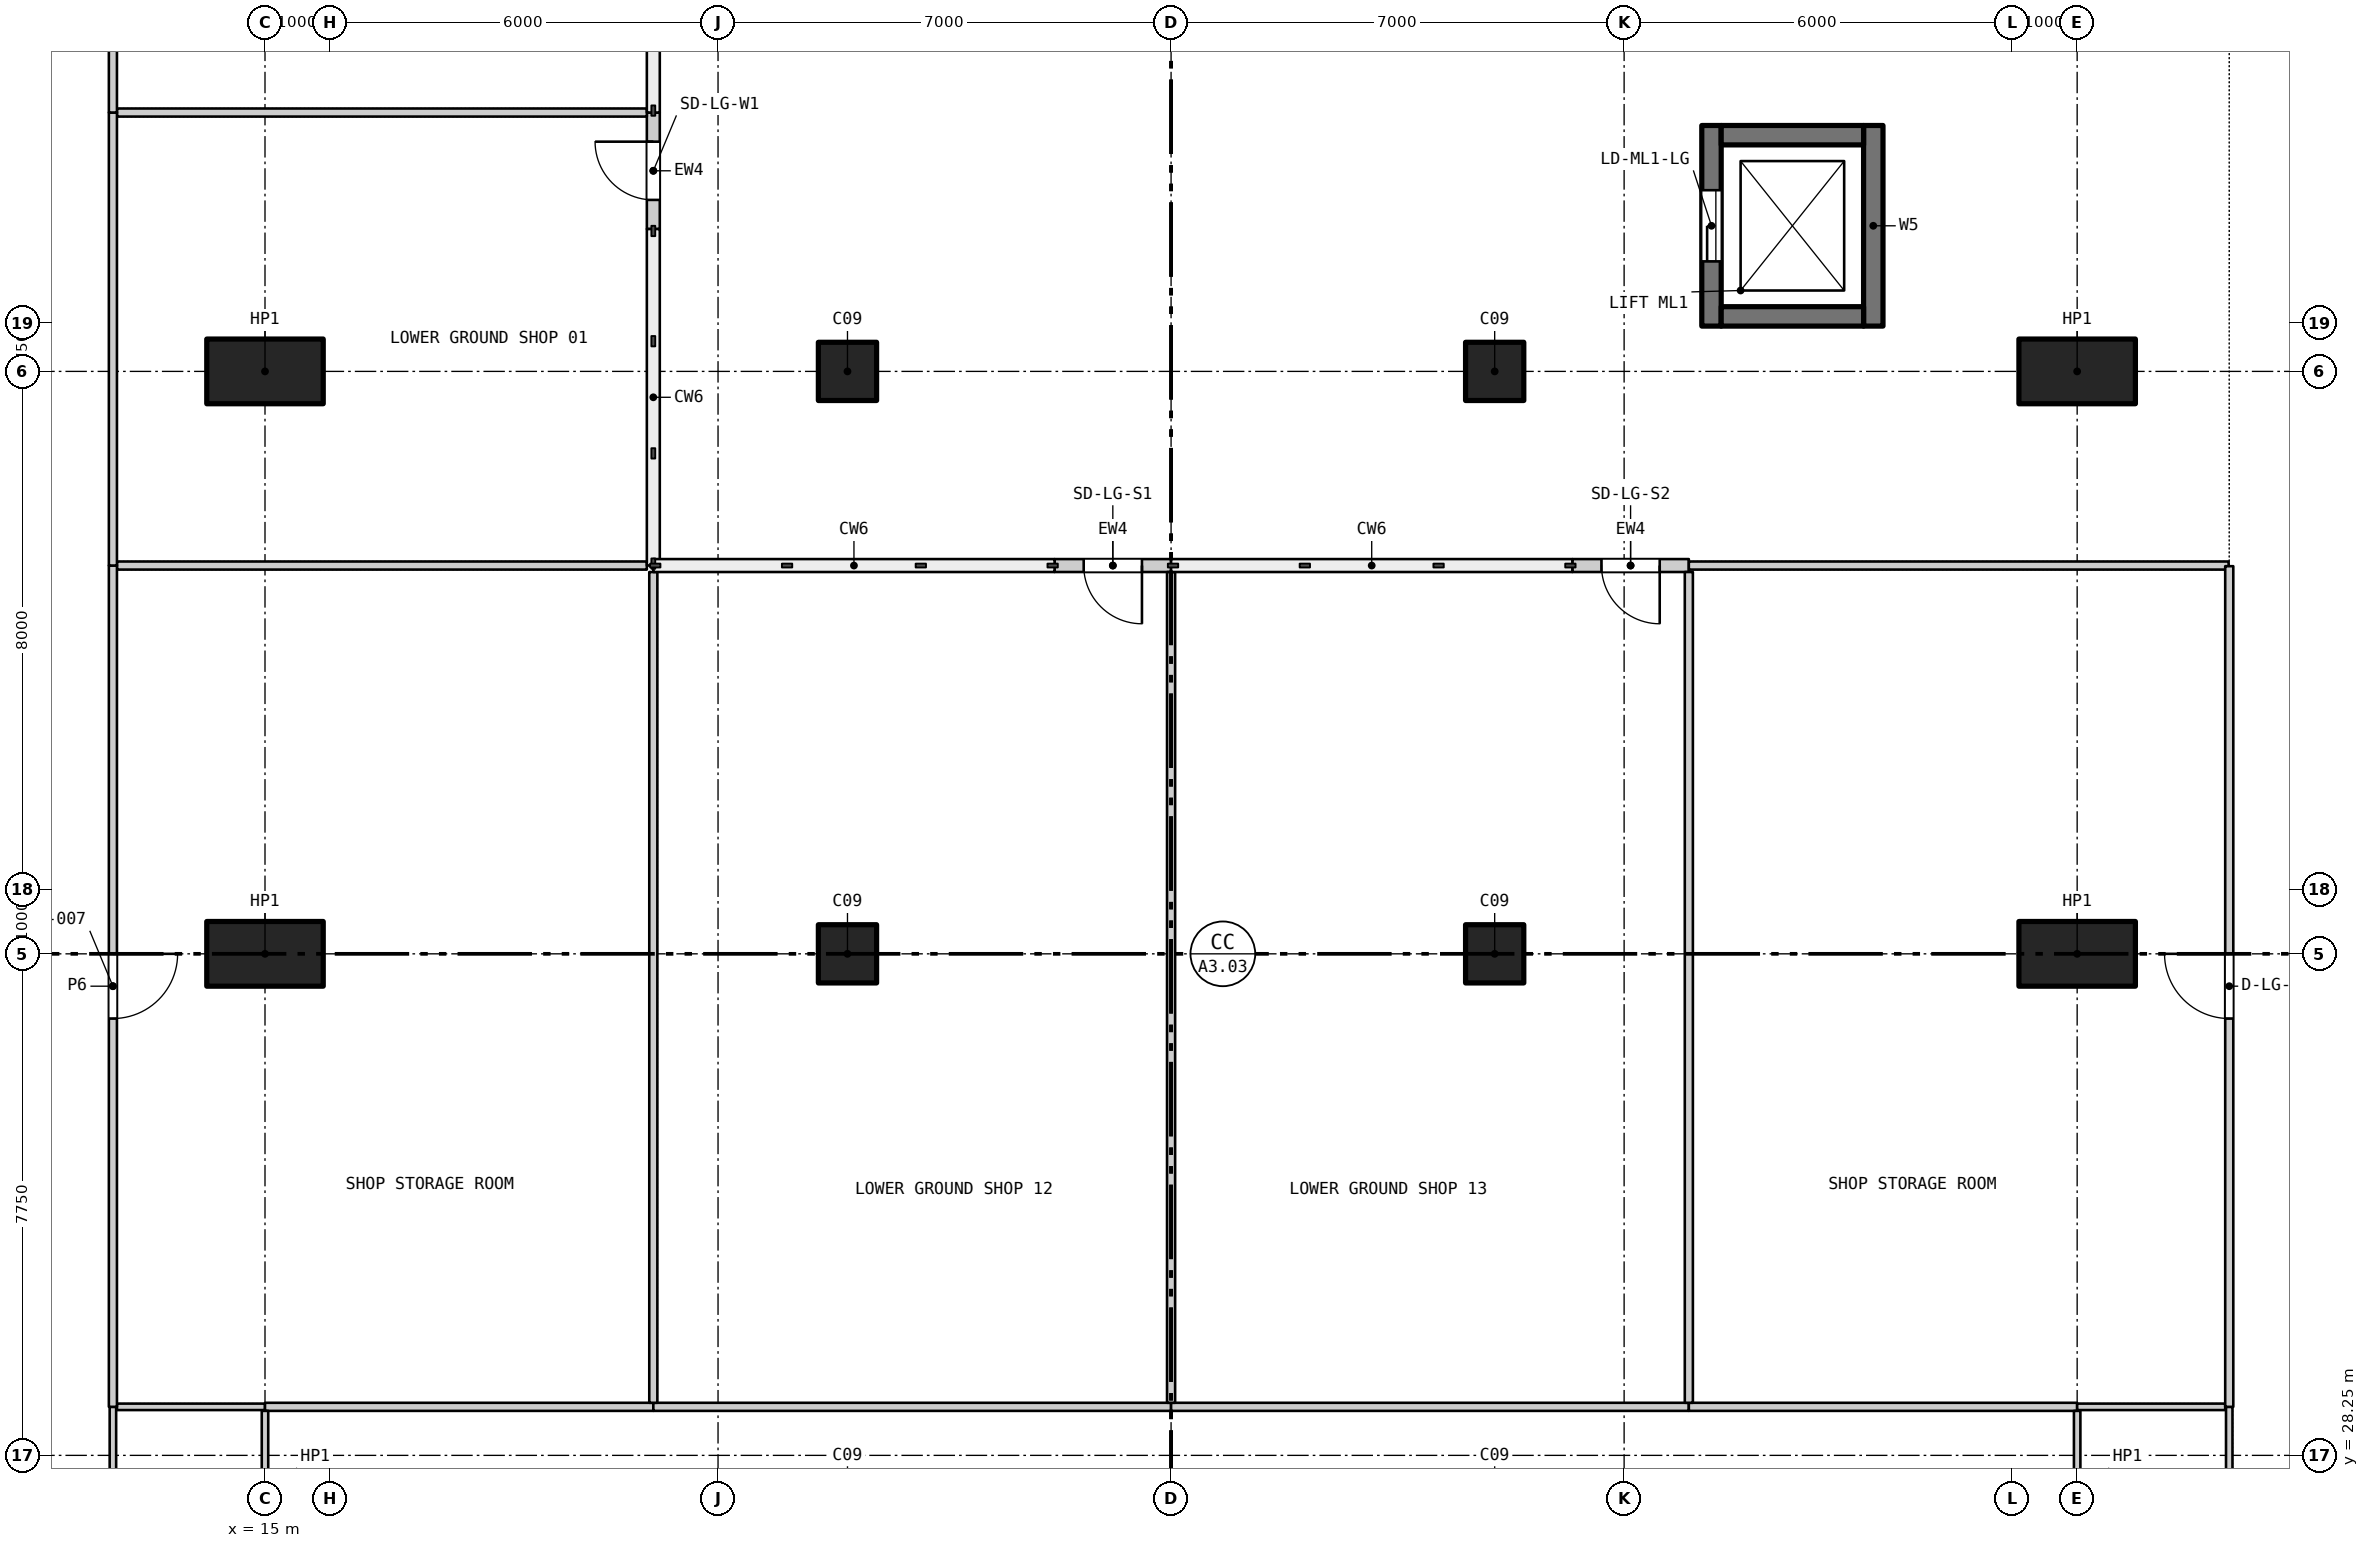
"""IFC4 building model, lengths in metres.
Left out: names, types, materials, properties, quantities, classifications, styles, units other than length and angle.
Written with IfcOpenShell. Run it as: python <this file> out.ifc"""

import sys

from ifc_helpers import new_model, si_unit, direction, frame, frame_2d, origin, origin_2d, place, context, subcontext, project, spatial, rectangle, extrude, element, fill, save


model = new_model("IFC4")
c1 = context("Model", 3, precision=1e-05, world=origin(), true_north=direction((0.0, 1.0)))
c2 = subcontext(c1, "Body", "Model", "MODEL_VIEW")
j1 = project(units=[si_unit("LENGTHUNIT", "METRE"), si_unit("PLANEANGLEUNIT", "RADIAN")], contexts=[c1])
p1 = place(None, origin())
s1 = spatial("IfcSite", under=j1, at=p1, CompositionType="ELEMENT")
p2 = place(p1, origin())
s2 = spatial("IfcBuilding", under=s1, at=p2, CompositionType="ELEMENT")
p3 = place(p2, frame((0.0, 0.0, -5.0)))
s3 = spatial("IfcBuildingStorey", under=s2, at=p3, CompositionType="ELEMENT", Elevation=-5.0)
for number, where, z_axis, x_axis in (
    (1, (24.0, 36.0, 0.0), (0.0, 0.0, 1.0), (1.0, 0.0, 0.0)),
    (2, (24.0, 45.0, 0.0), (0.0, 0.0, 1.0), (1.0, 0.0, 0.0)),
    (3, (34.0, 36.0, 0.0), (0.0, 0.0, 1.0), (1.0, 0.0, 0.0)),
    (4, (34.0, 45.0, 0.0), (0.0, 0.0, 1.0), (1.0, 0.0, 0.0)),
):
    element("IfcColumn", number, at=place(p3, frame(where, z_axis=z_axis, x_axis=x_axis)), inside=s3, PredefinedType="COLUMN", context=c2, shape_type="SweptSolid", body=[
        extrude(rectangle(XDim=0.9, YDim=0.9, at=origin_2d()), origin(), (0.0, 0.0, 1.0), 4.65),
    ])
p4 = place(p3, frame((37.35, 45.7, 0.0), z_axis=(0.0, 0.0, 1.0), x_axis=(0.0, 1.0, 0.0)))
e5 = element("IfcWall", 5, at=p4, inside=s3, PredefinedType="SHEAR", context=c2, shape_type="SweptSolid", body=[
    extrude(rectangle(XDim=3.1, YDim=0.3, at=frame_2d((1.55, 0.0))), origin(), (0.0, 0.0, 1.0), 5.0),
])
p5 = place(p4, frame((1.0, 0.0, 0.0)))
e6 = element("IfcOpeningElement", 6, at=p5, cuts=e5, PredefinedType="OPENING", context=c2, shape_type="SweptSolid", body=[
    extrude(rectangle(XDim=1.1, YDim=2.1, at=frame_2d((0.55, 1.05))), frame((0.0, 0.16, 0.0), z_axis=(0.0, -1.0, 0.0), x_axis=(1.0, 0.0, 0.0)), (0.0, 0.0, 1.0), 0.32),
])
p6 = place(p3, frame((39.85, 45.7, 0.0), z_axis=(0.0, 0.0, 1.0), x_axis=(0.0, 1.0, 0.0)))
e7 = element("IfcWall", 7, at=p6, inside=s3, PredefinedType="SHEAR", context=c2, shape_type="SweptSolid", body=[
    extrude(rectangle(XDim=3.1, YDim=0.3, at=frame_2d((1.55, 0.0))), origin(), (0.0, 0.0, 1.0), 5.0),
])
for number, where, z_axis, x_axis in (
    (8, (37.5, 45.85, 0.0), (0.0, 0.0, 1.0), (1.0, 0.0, 0.0)),
    (9, (37.5, 48.65, 0.0), (0.0, 0.0, 1.0), (1.0, 0.0, 0.0)),
):
    element("IfcWall", number, at=place(p3, frame(where, z_axis=z_axis, x_axis=x_axis)), inside=s3, PredefinedType="SHEAR", context=c2, shape_type="SweptSolid", body=[
        extrude(rectangle(XDim=2.2, YDim=0.3, at=frame_2d((1.1, 0.0))), origin(), (0.0, 0.0, 1.0), 5.0),
    ])
for number, where, z_axis, x_axis in (
    (10, (15.0, 36.0, 0.0), (0.0, 0.0, 1.0), (1.0, 0.0, 0.0)),
    (11, (43.0, 36.0, 0.0), (0.0, 0.0, 1.0), (1.0, 0.0, 0.0)),
    (12, (15.0, 45.0, 0.0), (0.0, 0.0, 1.0), (1.0, 0.0, 0.0)),
    (13, (43.0, 45.0, 0.0), (0.0, 0.0, 1.0), (1.0, 0.0, 0.0)),
):
    element("IfcColumn", number, at=place(p3, frame(where, z_axis=z_axis, x_axis=x_axis)), inside=s3, PredefinedType="COLUMN", context=c2, shape_type="SweptSolid", body=[
        extrude(rectangle(XDim=1.8, YDim=1.0, at=origin_2d()), origin(), (0.0, 0.0, 1.0), 5.0),
    ])
p7 = place(p3, frame((21.0, 47.2, 0.0), z_axis=(0.0, 0.0, 1.0), x_axis=(0.0, 1.0, 0.0)))
e14 = element("IfcWall", 14, at=p7, inside=s3, PredefinedType="PARTITIONING", context=c2, shape_type="SweptSolid", body=[
    extrude(rectangle(XDim=1.8, YDim=0.2, at=frame_2d((0.9, 0.0))), origin(), (0.0, 0.0, 1.0), 4.65),
])
p8 = place(p7, frame((0.45, 0.0, 0.0)))
e15 = element("IfcOpeningElement", 15, at=p8, cuts=e14, PredefinedType="OPENING", context=c2, shape_type="SweptSolid", body=[
    extrude(rectangle(XDim=0.9, YDim=2.1, at=frame_2d((0.45, 1.05))), frame((0.0, 0.11, 0.0), z_axis=(0.0, -1.0, 0.0), x_axis=(1.0, 0.0, 0.0)), (0.0, 0.0, 1.0), 0.22),
])
p9 = place(p3, frame((29.0, 42.0, 0.0), z_axis=(0.0, 0.0, 1.0), x_axis=(-1.0, 0.0, 0.0)))
e16 = element("IfcWall", 16, at=p9, inside=s3, PredefinedType="PARTITIONING", context=c2, shape_type="SweptSolid", body=[
    extrude(rectangle(XDim=1.8, YDim=0.2, at=frame_2d((0.9, 0.0))), origin(), (0.0, 0.0, 1.0), 4.65),
])
p10 = place(p9, frame((0.45, 0.0, 0.0)))
e17 = element("IfcOpeningElement", 17, at=p10, cuts=e16, PredefinedType="OPENING", context=c2, shape_type="SweptSolid", body=[
    extrude(rectangle(XDim=0.9, YDim=2.1, at=frame_2d((0.45, 1.05))), frame((0.0, 0.11, 0.0), z_axis=(0.0, -1.0, 0.0), x_axis=(1.0, 0.0, 0.0)), (0.0, 0.0, 1.0), 0.22),
])
p11 = place(p3, frame((37.0, 42.0, 0.0), z_axis=(0.0, 0.0, 1.0), x_axis=(-1.0, 0.0, 0.0)))
e18 = element("IfcWall", 18, at=p11, inside=s3, PredefinedType="PARTITIONING", context=c2, shape_type="SweptSolid", body=[
    extrude(rectangle(XDim=1.8, YDim=0.2, at=frame_2d((0.9, 0.0))), origin(), (0.0, 0.0, 1.0), 4.65),
])
p12 = place(p11, frame((0.45, 0.0, 0.0)))
e19 = element("IfcOpeningElement", 19, at=p12, cuts=e18, PredefinedType="OPENING", context=c2, shape_type="SweptSolid", body=[
    extrude(rectangle(XDim=0.9, YDim=2.1, at=frame_2d((0.45, 1.05))), frame((0.0, 0.11, 0.0), z_axis=(0.0, -1.0, 0.0), x_axis=(1.0, 0.0, 0.0)), (0.0, 0.0, 1.0), 0.22),
])
p13 = place(p3, frame((12.712, 29.0, 0.0), z_axis=(0.0, 0.0, 1.0), x_axis=(1.0, 0.0, 0.0)))
e20 = element("IfcWall", 20, at=p13, inside=s3, PredefinedType="PARTITIONING", context=c2, shape_type="SweptSolid", body=[
    extrude(rectangle(XDim=2.288, YDim=0.1, at=frame_2d((1.144, 0.0))), origin(), (0.0, 0.0, 1.0), 4.65),
])
p14 = place(p3, frame((15.0, 29.0, 0.0), z_axis=(0.0, 0.0, 1.0), x_axis=(1.0, 0.0, 0.0)))
e21 = element("IfcWall", 21, at=p14, inside=s3, PredefinedType="PARTITIONING", context=c2, shape_type="SweptSolid", body=[
    extrude(rectangle(XDim=6.0, YDim=0.125, at=frame_2d((3.0, 0.0))), origin(), (0.0, 0.0, 1.0), 4.65),
])
for number, where, z_axis, x_axis in (
    (22, (21.0, 29.0, 0.0), (0.0, 0.0, 1.0), (1.0, 0.0, 0.0)),
    (23, (29.0, 29.0, 0.0), (0.0, 0.0, 1.0), (1.0, 0.0, 0.0)),
):
    element("IfcWall", number, at=place(p3, frame(where, z_axis=z_axis, x_axis=x_axis)), inside=s3, PredefinedType="PARTITIONING", context=c2, shape_type="SweptSolid", body=[
        extrude(rectangle(XDim=8.0, YDim=0.125, at=frame_2d((4.0, 0.0))), origin(), (0.0, 0.0, 1.0), 4.65),
    ])
p15 = place(p3, frame((37.0, 29.0, 0.0), z_axis=(0.0, 0.0, 1.0), x_axis=(1.0, 0.0, 0.0)))
e24 = element("IfcWall", 24, at=p15, inside=s3, PredefinedType="PARTITIONING", context=c2, shape_type="SweptSolid", body=[
    extrude(rectangle(XDim=6.0, YDim=0.125, at=frame_2d((3.0, 0.0))), origin(), (0.0, 0.0, 1.0), 4.65),
])
p16 = place(p3, frame((43.0, 29.0, 0.0), z_axis=(0.0, 0.0, 1.0), x_axis=(1.0, 0.0, 0.0)))
e25 = element("IfcWall", 25, at=p16, inside=s3, PredefinedType="PARTITIONING", context=c2, shape_type="SweptSolid", body=[
    extrude(rectangle(XDim=2.288, YDim=0.1, at=frame_2d((1.144, 0.0))), origin(), (0.0, 0.0, 1.0), 4.65),
])
p17 = place(p3, frame((12.712, 42.0, 0.0), z_axis=(0.0, 0.0, 1.0), x_axis=(1.0, 0.0, 0.0)))
e26 = element("IfcWall", 26, at=p17, inside=s3, PredefinedType="PARTITIONING", context=c2, shape_type="SweptSolid", body=[
    extrude(rectangle(XDim=8.188, YDim=0.125, at=frame_2d((4.094, 0.0))), origin(), (0.0, 0.0, 1.0), 4.65),
])
p18 = place(p3, frame((37.0, 42.0, 0.0), z_axis=(0.0, 0.0, 1.0), x_axis=(1.0, 0.0, 0.0)))
e27 = element("IfcWall", 27, at=p18, inside=s3, PredefinedType="PARTITIONING", context=c2, shape_type="SweptSolid", body=[
    extrude(rectangle(XDim=8.34, YDim=0.125, at=frame_2d((4.17, 0.0))), origin(), (0.0, 0.0, 1.0), 4.65),
])
p19 = place(p3, frame((12.712, 49.0, 0.0), z_axis=(0.0, 0.0, 1.0), x_axis=(1.0, 0.0, 0.0)))
e28 = element("IfcWall", 28, at=p19, inside=s3, PredefinedType="PARTITIONING", context=c2, shape_type="SweptSolid", body=[
    extrude(rectangle(XDim=8.188, YDim=0.125, at=frame_2d((4.094, 0.0))), origin(), (0.0, 0.0, 1.0), 4.65),
])
p20 = place(p3, frame((12.65, 27.05, 0.0), z_axis=(0.0, 0.0, 1.0), x_axis=(0.0, 1.0, 0.0)))
e29 = element("IfcWall", 29, at=p20, inside=s3, PredefinedType="PARTITIONING", context=c2, shape_type="SweptSolid", body=[
    extrude(rectangle(XDim=1.95, YDim=0.1, at=frame_2d((0.975, 0.0))), origin(), (0.0, 0.0, 1.0), 4.7),
])
p21 = place(p3, frame((12.65, 29.0, 0.0), z_axis=(0.0, 0.0, 1.0), x_axis=(0.0, 1.0, 0.0)))
e30 = element("IfcWall", 30, at=p21, inside=s3, PredefinedType="PARTITIONING", context=c2, shape_type="SweptSolid", body=[
    extrude(rectangle(XDim=13.0, YDim=0.125, at=frame_2d((6.5, 0.0))), origin(), (0.0, 0.0, 1.0), 4.65),
])
p22 = place(p21, frame((6.0, 0.0, 0.0)))
e31 = element("IfcOpeningElement", 31, at=p22, cuts=e30, PredefinedType="OPENING", context=c2, shape_type="SweptSolid", body=[
    extrude(rectangle(XDim=1.0, YDim=2.1, at=frame_2d((0.5, 1.05))), frame((0.0, 0.073, 0.0), z_axis=(0.0, -1.0, 0.0), x_axis=(1.0, 0.0, 0.0)), (0.0, 0.0, 1.0), 0.145),
])
for number, where, z_axis, x_axis in (
    (32, (12.65, 42.0, 0.0), (0.0, 0.0, 1.0), (0.0, 1.0, 0.0)),
    (33, (12.65, 49.0, 0.0), (0.0, 0.0, 1.0), (0.0, 1.0, 0.0)),
):
    element("IfcWall", number, at=place(p3, frame(where, z_axis=z_axis, x_axis=x_axis)), inside=s3, PredefinedType="PARTITIONING", context=c2, shape_type="SweptSolid", body=[
        extrude(rectangle(XDim=7.0, YDim=0.125, at=frame_2d((3.5, 0.0))), origin(), (0.0, 0.0, 1.0), 4.65),
    ])
p23 = place(p3, frame((15.0, 27.95, 0.0), z_axis=(0.0, 0.0, 1.0), x_axis=(0.0, 1.0, 0.0)))
e34 = element("IfcWall", 34, at=p23, inside=s3, PredefinedType="PARTITIONING", context=c2, shape_type="SweptSolid", body=[
    extrude(rectangle(XDim=0.988, YDim=0.1, at=frame_2d((0.494, 0.0))), origin(), (0.0, 0.0, 1.0), 4.65),
])
for number, where, z_axis, x_axis in (
    (35, (21.0, 29.062, 0.0), (0.0, 0.0, 1.0), (0.0, 1.0, 0.0)),
    (36, (29.0, 29.062, 0.0), (0.0, 0.0, 1.0), (0.0, 1.0, 0.0)),
    (37, (37.0, 29.062, 0.0), (0.0, 0.0, 1.0), (0.0, 1.0, 0.0)),
):
    element("IfcWall", number, at=place(p3, frame(where, z_axis=z_axis, x_axis=x_axis)), inside=s3, PredefinedType="PARTITIONING", context=c2, shape_type="SweptSolid", body=[
        extrude(rectangle(XDim=12.837, YDim=0.125, at=frame_2d((6.419, 0.0))), origin(), (0.0, 0.0, 1.0), 4.65),
    ])
p24 = place(p3, frame((43.0, 27.95, 0.0), z_axis=(0.0, 0.0, 1.0), x_axis=(0.0, 1.0, 0.0)))
e38 = element("IfcWall", 38, at=p24, inside=s3, PredefinedType="PARTITIONING", context=c2, shape_type="SweptSolid", body=[
    extrude(rectangle(XDim=0.988, YDim=0.1, at=frame_2d((0.494, 0.0))), origin(), (0.0, 0.0, 1.0), 4.65),
])
p25 = place(p3, frame((45.35, 27.05, 0.0), z_axis=(0.0, 0.0, 1.0), x_axis=(0.0, 1.0, 0.0)))
e39 = element("IfcWall", 39, at=p25, inside=s3, PredefinedType="PARTITIONING", context=c2, shape_type="SweptSolid", body=[
    extrude(rectangle(XDim=1.95, YDim=0.1, at=frame_2d((0.975, 0.0))), origin(), (0.0, 0.0, 1.0), 4.7),
])
p26 = place(p3, frame((45.35, 29.0, 0.0), z_axis=(0.0, 0.0, 1.0), x_axis=(0.0, 1.0, 0.0)))
e40 = element("IfcWall", 40, at=p26, inside=s3, PredefinedType="PARTITIONING", context=c2, shape_type="SweptSolid", body=[
    extrude(rectangle(XDim=12.99, YDim=0.125, at=frame_2d((6.495, 0.0))), origin(), (0.0, 0.0, 1.0), 4.65),
])
p27 = place(p26, frame((6.0, 0.0, 0.0)))
e41 = element("IfcOpeningElement", 41, at=p27, cuts=e40, PredefinedType="OPENING", context=c2, shape_type="SweptSolid", body=[
    extrude(rectangle(XDim=1.0, YDim=2.1, at=frame_2d((0.5, 1.05))), frame((0.0, 0.073, 0.0), z_axis=(0.0, -1.0, 0.0), x_axis=(1.0, 0.0, 0.0)), (0.0, 0.0, 1.0), 0.145),
])
p28 = place(p8, origin())
e42 = element("IfcDoor", 42, at=p28, inside=s3, OperationType="SINGLE_SWING_RIGHT", PredefinedType="DOOR", context=c2, shape_type="SweptSolid", body=[
    extrude(rectangle(XDim=0.9, YDim=2.1, at=frame_2d((0.45, 1.05))), frame((0.0, 0.025, 0.0), z_axis=(0.0, -1.0, 0.0), x_axis=(1.0, 0.0, 0.0)), (0.0, 0.0, 1.0), 0.05),
])
fill(e15, e42)
p29 = place(p10, origin())
e43 = element("IfcDoor", 43, at=p29, inside=s3, OperationType="SINGLE_SWING_LEFT", PredefinedType="DOOR", context=c2, shape_type="SweptSolid", body=[
    extrude(rectangle(XDim=0.9, YDim=2.1, at=frame_2d((0.45, 1.05))), frame((0.0, 0.025, 0.0), z_axis=(0.0, -1.0, 0.0), x_axis=(1.0, 0.0, 0.0)), (0.0, 0.0, 1.0), 0.05),
])
fill(e17, e43)
p30 = place(p12, origin())
e44 = element("IfcDoor", 44, at=p30, inside=s3, OperationType="SINGLE_SWING_LEFT", PredefinedType="DOOR", context=c2, shape_type="SweptSolid", body=[
    extrude(rectangle(XDim=0.9, YDim=2.1, at=frame_2d((0.45, 1.05))), frame((0.0, 0.025, 0.0), z_axis=(0.0, -1.0, 0.0), x_axis=(1.0, 0.0, 0.0)), (0.0, 0.0, 1.0), 0.05),
])
fill(e19, e44)
p31 = place(p22, frame((1.0, 0.0, 0.0), z_axis=(0.0, 0.0, 1.0), x_axis=(-1.0, 0.0, 0.0)))
e45 = element("IfcDoor", 45, at=p31, inside=s3, OperationType="SINGLE_SWING_LEFT", PredefinedType="DOOR", context=c2, shape_type="SweptSolid", body=[
    extrude(rectangle(XDim=1.0, YDim=2.1, at=frame_2d((0.5, 1.05))), frame((0.0, 0.025, 0.0), z_axis=(0.0, -1.0, 0.0), x_axis=(1.0, 0.0, 0.0)), (0.0, 0.0, 1.0), 0.05),
])
fill(e31, e45)
p32 = place(p27, origin())
e46 = element("IfcDoor", 46, at=p32, inside=s3, OperationType="SINGLE_SWING_RIGHT", PredefinedType="DOOR", context=c2, shape_type="SweptSolid", body=[
    extrude(rectangle(XDim=1.0, YDim=2.1, at=frame_2d((0.5, 1.05))), frame((0.0, 0.025, 0.0), z_axis=(0.0, -1.0, 0.0), x_axis=(1.0, 0.0, 0.0)), (0.0, 0.0, 1.0), 0.05),
])
fill(e41, e46)
p33 = place(p5, origin())
e47 = element("IfcDoor", 47, at=p33, inside=s3, OperationType="SLIDING_TO_LEFT", PredefinedType="DOOR", context=c2, shape_type="SweptSolid", body=[
    extrude(rectangle(XDim=1.1, YDim=2.1, at=frame_2d((0.55, 1.05))), frame((0.0, 0.025, 0.0), z_axis=(0.0, -1.0, 0.0), x_axis=(1.0, 0.0, 0.0)), (0.0, 0.0, 1.0), 0.05),
])
fill(e6, e47)
save(model, sys.argv[1])
